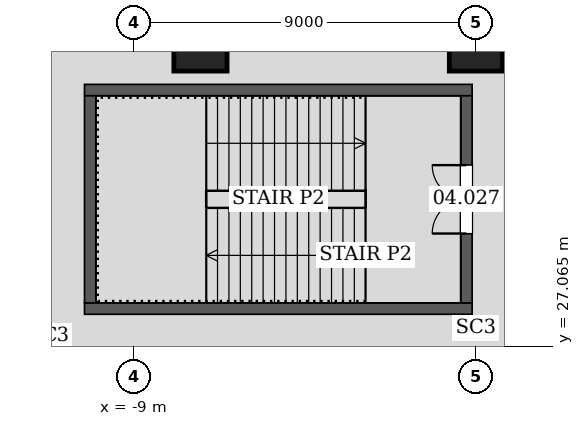
"""IFC4 building model, lengths in metres.
Left out: names, types, materials, properties, quantities, classifications, styles, units other than length and angle.
Written with IfcOpenShell. Run it as: python <this file> out.ifc"""

import sys

from ifc_helpers import new_model, si_unit, direction, frame, frame_2d, origin, origin_2d, place, context, subcontext, project, spatial, rectangle, extrude, element, fill, save


model = new_model("IFC4")
c1 = context("Model", 3, precision=1e-05, world=origin(), true_north=direction((0.0, 1.0)))
c2 = subcontext(c1, "Body", "Model", "MODEL_VIEW")
j1 = project(units=[si_unit("LENGTHUNIT", "METRE"), si_unit("PLANEANGLEUNIT", "RADIAN")], contexts=[c1])
p1 = place(None, origin())
s1 = spatial("IfcSite", under=j1, at=p1, CompositionType="ELEMENT")
p2 = place(p1, origin())
s2 = spatial("IfcBuilding", under=s1, at=p2, CompositionType="ELEMENT")
p3 = place(p2, frame((0.0, 0.0, 24.0)))
s3 = spatial("IfcBuildingStorey", under=s2, at=p3, CompositionType="ELEMENT", Elevation=24.0)
for number, where, z_axis, x_axis in (
    (1, (0.0, 35.0, 0.0), (0.0, 0.0, 1.0), (1.0, 0.0, 0.0)),
    (2, (-7.249, 35.0, 0.0), (0.0, 0.0, 1.0), (1.0, 0.0, 0.0)),
):
    element("IfcColumn", number, at=place(p3, frame(where, z_axis=z_axis, x_axis=x_axis)), inside=s3, PredefinedType="COLUMN", context=c2, shape_type="SweptSolid", body=[
        extrude(rectangle(XDim=1.4, YDim=1.4, at=origin_2d()), origin(), (0.0, 0.0, 1.0), 4.8),
    ])
for number, where, z_axis, x_axis in (
    (3, (-10.3, 28.05, 0.0), (0.0, 0.0, 1.0), (1.0, 0.0, 0.0)),
    (4, (-0.1, 33.8, 0.0), (0.0, 0.0, 1.0), (-1.0, 0.0, 0.0)),
):
    element("IfcWall", number, at=place(p3, frame(where, z_axis=z_axis, x_axis=x_axis)), inside=s3, PredefinedType="SOLIDWALL", context=c2, shape_type="SweptSolid", body=[
        extrude(rectangle(XDim=10.2, YDim=0.3, at=frame_2d((5.1, 0.0))), origin(), (0.0, 0.0, 1.0), 4.8),
    ])
p4 = place(p3, frame((-10.15, 33.65, 0.0), z_axis=(0.0, 0.0, 1.0), x_axis=(0.0, -1.0, 0.0)))
e5 = element("IfcWall", 5, at=p4, inside=s3, PredefinedType="SOLIDWALL", context=c2, shape_type="SweptSolid", body=[
    extrude(rectangle(XDim=5.45, YDim=0.3, at=frame_2d((2.725, 0.0))), origin(), (0.0, 0.0, 1.0), 4.8),
])
p5 = place(p3, frame((-0.25, 28.2, 0.0), z_axis=(0.0, 0.0, 1.0), x_axis=(0.0, 1.0, 0.0)))
e6 = element("IfcWall", 6, at=p5, inside=s3, PredefinedType="SOLIDWALL", context=c2, shape_type="SweptSolid", body=[
    extrude(rectangle(XDim=5.45, YDim=0.3, at=frame_2d((2.725, 0.0))), origin(), (0.0, 0.0, 1.0), 4.8),
])
p6 = place(p5, frame((1.825, 0.0, 0.0)))
e7 = element("IfcOpeningElement", 7, at=p6, cuts=e6, PredefinedType="OPENING", context=c2, shape_type="SweptSolid", body=[
    extrude(rectangle(XDim=1.8, YDim=2.1, at=frame_2d((0.9, 1.05))), frame((0.0, 0.16, 0.0), z_axis=(0.0, -1.0, 0.0), x_axis=(1.0, 0.0, 0.0)), (0.0, 0.0, 1.0), 0.32),
])
p7 = place(p6, origin())
e8 = element("IfcDoor", 8, at=p7, inside=s3, OperationType="DOUBLE_DOOR_SINGLE_SWING", PredefinedType="DOOR", context=c2, shape_type="SweptSolid", body=[
    extrude(rectangle(XDim=1.8, YDim=2.1, at=frame_2d((0.9, 1.05))), frame((0.0, 0.025, 0.0), z_axis=(0.0, -1.0, 0.0), x_axis=(1.0, 0.0, 0.0)), (0.0, 0.0, 1.0), 0.05),
])
fill(e7, e8)
save(model, sys.argv[1])
